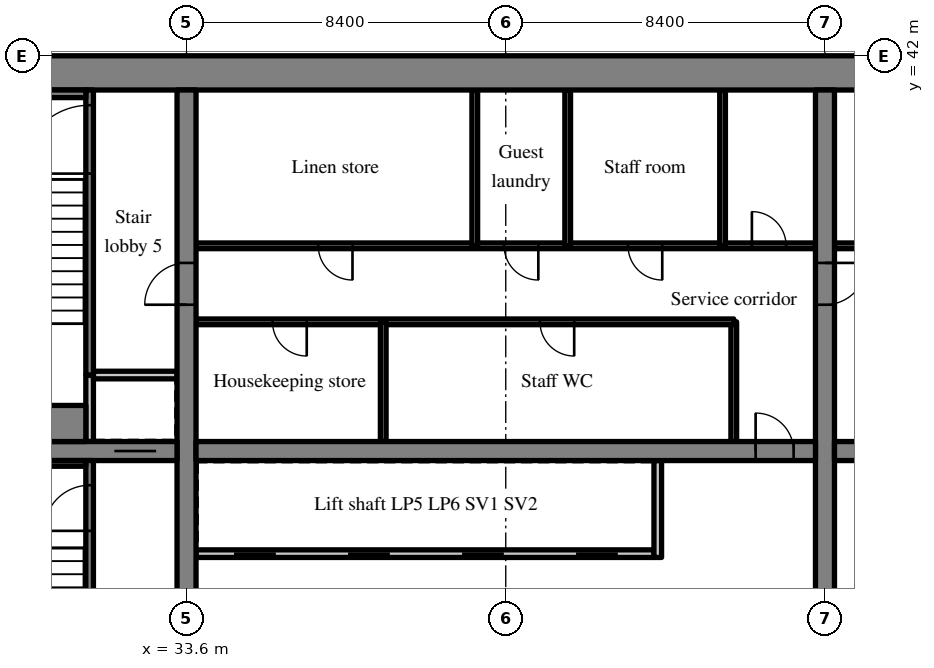
"""IFC4 building model, lengths in metres.
Left out: names, types, materials, properties, quantities, classifications, styles, units other than length and angle.
Written with IfcOpenShell. Run it as: python <this file> out.ifc"""

import sys

from ifc_helpers import new_model, si_unit, direction, frame, frame_2d, origin, place, context, subcontext, project, spatial, rectangle, extrude, source, transform, mapped, element, fill, save


model = new_model("IFC4")
c1 = context("Model", 3, precision=1e-05, world=origin(), true_north=direction((0.0, 1.0)))
c2 = subcontext(c1, "Body", "Model", "MODEL_VIEW")
j1 = project(units=[si_unit("LENGTHUNIT", "METRE"), si_unit("PLANEANGLEUNIT", "RADIAN")], contexts=[c1])
p1 = place(None, origin())
s1 = spatial("IfcSite", under=j1, at=p1, CompositionType="ELEMENT")
p2 = place(p1, origin())
s2 = spatial("IfcBuilding", under=s1, at=p2, CompositionType="ELEMENT")
p3 = place(p2, frame((0.0, 0.0, 86.4)))
s3 = spatial("IfcBuildingStorey", under=s2, at=p3, CompositionType="ELEMENT", Elevation=86.4)
m1 = source(origin(), c2, "Body", "SweptSolid", [
    extrude(rectangle(XDim=50.4, YDim=0.9, at=frame_2d((25.2, 0.0))), origin(), (0.0, 0.0, 1.0), 4.72),
])
p4 = place(p3, frame((25.2, 41.55, 0.0), z_axis=(0.0, 0.0, 1.0), x_axis=(1.0, 0.0, 0.0)))
e1 = element("IfcWall", 1, at=p4, inside=s3, PredefinedType="SHEAR", context=c2, shape_type="MappedRepresentation", body=[
    mapped(m1, transform((0.0, 0.0, 0.0), scale=1.0)),
])
m2 = source(origin(), c2, "Body", "SweptSolid", [
    extrude(rectangle(XDim=18.2, YDim=0.5, at=frame_2d((9.1, 0.0))), origin(), (0.0, 0.0, 1.0), 4.72),
])
p5 = place(p3, frame((33.6, 22.9, 0.0), z_axis=(0.0, 0.0, 1.0), x_axis=(0.0, 1.0, 0.0)))
e2 = element("IfcWall", 2, at=p5, inside=s3, PredefinedType="SHEAR", context=c2, shape_type="MappedRepresentation", body=[
    mapped(m2, transform((0.0, 0.0, 0.0), scale=1.0)),
])
m3 = source(origin(), c2, "Body", "SweptSolid", [
    extrude(rectangle(XDim=1.1, YDim=2.1, at=frame_2d((0.55, 1.05))), frame((0.0, 0.26, 0.0), z_axis=(0.0, -1.0, 0.0), x_axis=(1.0, 0.0, 0.0)), (0.0, 0.0, 1.0), 0.52),
])
p6 = place(p5, frame((12.55, 0.0, 0.0)))
e3 = element("IfcOpeningElement", 3, at=p6, cuts=e2, PredefinedType="OPENING", context=c2, shape_type="MappedRepresentation", body=[
    mapped(m3, transform((0.0, 0.0, 0.0), scale=1.0)),
])
p7 = place(p3, frame((50.4, 22.9, 0.0), z_axis=(0.0, 0.0, 1.0), x_axis=(0.0, 1.0, 0.0)))
e4 = element("IfcWall", 4, at=p7, inside=s3, PredefinedType="SHEAR", context=c2, shape_type="MappedRepresentation", body=[
    mapped(m2, transform((0.0, 0.0, 0.0), scale=1.0)),
])
p8 = place(p7, frame((12.55, 0.0, 0.0)))
e5 = element("IfcOpeningElement", 5, at=p8, cuts=e4, PredefinedType="OPENING", context=c2, shape_type="MappedRepresentation", body=[
    mapped(m3, transform((0.0, 0.0, 0.0), scale=1.0)),
])
m4 = source(origin(), c2, "Body", "SweptSolid", [
    extrude(rectangle(XDim=7.25, YDim=0.5, at=frame_2d((3.625, 0.0))), origin(), (0.0, 0.0, 1.0), 4.72),
])
p9 = place(p3, frame((26.1, 31.6, 0.0), z_axis=(0.0, 0.0, 1.0), x_axis=(1.0, 0.0, 0.0)))
e6 = element("IfcWall", 6, at=p9, inside=s3, PredefinedType="SHEAR", context=c2, shape_type="MappedRepresentation", body=[
    mapped(m4, transform((0.0, 0.0, 0.0), scale=1.0)),
])
p10 = place(p9, frame((5.6, 0.0, 0.0)))
e7 = element("IfcOpeningElement", 7, at=p10, cuts=e6, PredefinedType="OPENING", context=c2, shape_type="MappedRepresentation", body=[
    mapped(m3, transform((0.0, 0.0, 0.0), scale=1.0)),
])
m5 = source(origin(), c2, "Body", "SweptSolid", [
    extrude(rectangle(XDim=16.3, YDim=0.5, at=frame_2d((8.15, 0.0))), origin(), (0.0, 0.0, 1.0), 4.72),
])
p11 = place(p3, frame((33.85, 31.6, 0.0), z_axis=(0.0, 0.0, 1.0), x_axis=(1.0, 0.0, 0.0)))
e8 = element("IfcWall", 8, at=p11, inside=s3, PredefinedType="SHEAR", context=c2, shape_type="MappedRepresentation", body=[
    mapped(m5, transform((0.0, 0.0, 0.0), scale=1.0)),
])
m6 = source(origin(), c2, "Body", "SweptSolid", [
    extrude(rectangle(XDim=1.0, YDim=2.1, at=frame_2d((0.5, 1.05))), frame((0.0, 0.26, 0.0), z_axis=(0.0, -1.0, 0.0), x_axis=(1.0, 0.0, 0.0)), (0.0, 0.0, 1.0), 0.52),
])
p12 = place(p11, frame((14.725, 0.0, 0.0)))
e9 = element("IfcOpeningElement", 9, at=p12, cuts=e8, PredefinedType="OPENING", context=c2, shape_type="MappedRepresentation", body=[
    mapped(m6, transform((0.0, 0.0, 0.0), scale=1.0)),
])
m7 = source(origin(), c2, "Body", "SweptSolid", [
    extrude(rectangle(XDim=16.3, YDim=0.5, at=frame_2d((8.15, 0.0))), origin(), (0.0, 0.0, 1.0), 4.72),
])
p13 = place(p3, frame((50.65, 31.6, 0.0), z_axis=(0.0, 0.0, 1.0), x_axis=(1.0, 0.0, 0.0)))
e10 = element("IfcWall", 10, at=p13, inside=s3, PredefinedType="SHEAR", context=c2, shape_type="MappedRepresentation", body=[
    mapped(m7, transform((0.0, 0.0, 0.0), scale=1.0)),
])
p14 = place(p13, frame((0.575, 0.0, 0.0)))
e11 = element("IfcOpeningElement", 11, at=p14, cuts=e10, PredefinedType="OPENING", context=c2, shape_type="MappedRepresentation", body=[
    mapped(m6, transform((0.0, 0.0, 0.0), scale=1.0)),
])
m8 = source(origin(), c2, "Body", "SweptSolid", [
    extrude(rectangle(XDim=12.05, YDim=0.2, at=frame_2d((6.025, 0.0))), origin(), (0.0, 0.0, 1.0), 4.72),
])
p15 = place(p3, frame((33.85, 28.9, 0.0), z_axis=(0.0, 0.0, 1.0), x_axis=(1.0, 0.0, 0.0)))
e12 = element("IfcWall", 12, at=p15, inside=s3, PredefinedType="SOLIDWALL", context=c2, shape_type="MappedRepresentation", body=[
    mapped(m8, transform((0.0, 0.0, 0.0), scale=1.0)),
])
m9 = source(origin(), c2, "Body", "SweptSolid", [
    extrude(rectangle(XDim=1.1, YDim=2.1, at=frame_2d((0.55, 1.05))), frame((0.0, 0.11, 0.0), z_axis=(0.0, -1.0, 0.0), x_axis=(1.0, 0.0, 0.0)), (0.0, 0.0, 1.0), 0.22),
])
p16 = place(p15, frame((1.0, 0.0, 0.0)))
e13 = element("IfcOpeningElement", 13, at=p16, cuts=e12, PredefinedType="OPENING", context=c2, shape_type="MappedRepresentation", body=[
    mapped(m9, transform((0.0, 0.0, 0.0), scale=1.0)),
])
p17 = place(p15, frame((4.0, 0.0, 0.0)))
e14 = element("IfcOpeningElement", 14, at=p17, cuts=e12, PredefinedType="OPENING", context=c2, shape_type="MappedRepresentation", body=[
    mapped(m9, transform((0.0, 0.0, 0.0), scale=1.0)),
])
p18 = place(p15, frame((7.0, 0.0, 0.0)))
e15 = element("IfcOpeningElement", 15, at=p18, cuts=e12, PredefinedType="OPENING", context=c2, shape_type="MappedRepresentation", body=[
    mapped(m9, transform((0.0, 0.0, 0.0), scale=1.0)),
])
p19 = place(p15, frame((10.0, 0.0, 0.0)))
e16 = element("IfcOpeningElement", 16, at=p19, cuts=e12, PredefinedType="OPENING", context=c2, shape_type="MappedRepresentation", body=[
    mapped(m9, transform((0.0, 0.0, 0.0), scale=1.0)),
])
m10 = source(origin(), c2, "Body", "SweptSolid", [
    extrude(rectangle(XDim=2.55, YDim=0.2, at=frame_2d((1.275, 0.0))), origin(), (0.0, 0.0, 1.0), 4.72),
])
p20 = place(p3, frame((46.0, 28.8, 0.0), z_axis=(0.0, 0.0, 1.0), x_axis=(0.0, 1.0, 0.0)))
e17 = element("IfcWall", 17, at=p20, inside=s3, PredefinedType="SOLIDWALL", context=c2, shape_type="MappedRepresentation", body=[
    mapped(m10, transform((0.0, 0.0, 0.0), scale=1.0)),
])
m11 = source(origin(), c2, "Body", "SweptSolid", [
    extrude(rectangle(XDim=3.15, YDim=0.15, at=frame_2d((1.575, 0.0))), origin(), (0.0, 0.0, 1.0), 4.72),
])
p21 = place(p3, frame((48.0, 31.85, 0.0), z_axis=(0.0, 0.0, 1.0), x_axis=(0.0, 1.0, 0.0)))
e18 = element("IfcWall", 18, at=p21, inside=s3, PredefinedType="PARTITIONING", context=c2, shape_type="MappedRepresentation", body=[
    mapped(m11, transform((0.0, 0.0, 0.0), scale=1.0)),
])
m12 = source(origin(), c2, "Body", "SweptSolid", [
    extrude(rectangle(XDim=14.15, YDim=0.15, at=frame_2d((7.075, 0.0))), origin(), (0.0, 0.0, 1.0), 4.72),
])
p22 = place(p3, frame((33.85, 35.0, 0.0), z_axis=(0.0, 0.0, 1.0), x_axis=(1.0, 0.0, 0.0)))
e19 = element("IfcWall", 19, at=p22, inside=s3, PredefinedType="PARTITIONING", context=c2, shape_type="MappedRepresentation", body=[
    mapped(m12, transform((0.0, 0.0, 0.0), scale=1.0)),
])
m13 = source(origin(), c2, "Body", "SweptSolid", [
    extrude(rectangle(XDim=0.9, YDim=2.1, at=frame_2d((0.45, 1.05))), frame((0.0, 0.085, 0.0), z_axis=(0.0, -1.0, 0.0), x_axis=(1.0, 0.0, 0.0)), (0.0, 0.0, 1.0), 0.17),
])
p23 = place(p22, frame((2.013, 0.0, 0.0)))
e20 = element("IfcOpeningElement", 20, at=p23, cuts=e19, PredefinedType="OPENING", context=c2, shape_type="MappedRepresentation", body=[
    mapped(m13, transform((0.0, 0.0, 0.0), scale=1.0)),
])
p24 = place(p22, frame((9.051, 0.0, 0.0)))
e21 = element("IfcOpeningElement", 21, at=p24, cuts=e19, PredefinedType="OPENING", context=c2, shape_type="MappedRepresentation", body=[
    mapped(m13, transform((0.0, 0.0, 0.0), scale=1.0)),
])
m14 = source(origin(), c2, "Body", "SweptSolid", [
    extrude(rectangle(XDim=16.3, YDim=0.15, at=frame_2d((8.15, 0.0))), origin(), (0.0, 0.0, 1.0), 4.72),
])
p25 = place(p3, frame((33.85, 37.0, 0.0), z_axis=(0.0, 0.0, 1.0), x_axis=(1.0, 0.0, 0.0)))
e22 = element("IfcWall", 22, at=p25, inside=s3, PredefinedType="PARTITIONING", context=c2, shape_type="MappedRepresentation", body=[
    mapped(m14, transform((0.0, 0.0, 0.0), scale=1.0)),
])
p26 = place(p25, frame((3.217, 0.0, 0.0)))
e23 = element("IfcOpeningElement", 23, at=p26, cuts=e22, PredefinedType="OPENING", context=c2, shape_type="MappedRepresentation", body=[
    mapped(m13, transform((0.0, 0.0, 0.0), scale=1.0)),
])
p27 = place(p25, frame((8.107, 0.0, 0.0)))
e24 = element("IfcOpeningElement", 24, at=p27, cuts=e22, PredefinedType="OPENING", context=c2, shape_type="MappedRepresentation", body=[
    mapped(m13, transform((0.0, 0.0, 0.0), scale=1.0)),
])
p28 = place(p25, frame((11.368, 0.0, 0.0)))
e25 = element("IfcOpeningElement", 25, at=p28, cuts=e22, PredefinedType="OPENING", context=c2, shape_type="MappedRepresentation", body=[
    mapped(m13, transform((0.0, 0.0, 0.0), scale=1.0)),
])
p29 = place(p25, frame((14.627, 0.0, 0.0)))
e26 = element("IfcOpeningElement", 26, at=p29, cuts=e22, PredefinedType="OPENING", context=c2, shape_type="MappedRepresentation", body=[
    mapped(m13, transform((0.0, 0.0, 0.0), scale=1.0)),
])
p30 = place(p3, frame((38.776, 31.85, 0.0), z_axis=(0.0, 0.0, 1.0), x_axis=(0.0, 1.0, 0.0)))
e27 = element("IfcWall", 27, at=p30, inside=s3, PredefinedType="PARTITIONING", context=c2, shape_type="MappedRepresentation", body=[
    mapped(m11, transform((0.0, 0.0, 0.0), scale=1.0)),
])
m15 = source(origin(), c2, "Body", "SweptSolid", [
    extrude(rectangle(XDim=4.1, YDim=0.15, at=frame_2d((2.05, 0.0))), origin(), (0.0, 0.0, 1.0), 4.72),
])
for number, where, z_axis, x_axis in (
    (28, (41.185, 37.0, 0.0), (0.0, 0.0, 1.0), (0.0, 1.0, 0.0)),
    (29, (43.63, 37.0, 0.0), (0.0, 0.0, 1.0), (0.0, 1.0, 0.0)),
    (30, (47.705, 37.0, 0.0), (0.0, 0.0, 1.0), (0.0, 1.0, 0.0)),
):
    element("IfcWall", number, at=place(p3, frame(where, z_axis=z_axis, x_axis=x_axis)), inside=s3, PredefinedType="PARTITIONING", context=c2, shape_type="MappedRepresentation", body=[
        mapped(m15, transform((0.0, 0.0, 0.0), scale=1.0)),
    ])
m16 = source(origin(), c2, "Body", "SweptSolid", [
    extrude(rectangle(XDim=16.3, YDim=0.15, at=frame_2d((8.15, 0.0))), origin(), (0.0, 0.0, 1.0), 4.72),
])
p31 = place(p3, frame((66.95, 37.0, 0.0), z_axis=(0.0, 0.0, 1.0), x_axis=(-1.0, 0.0, 0.0)))
e31 = element("IfcWall", 31, at=p31, inside=s3, PredefinedType="PARTITIONING", context=c2, shape_type="MappedRepresentation", body=[
    mapped(m16, transform((0.0, 0.0, 0.0), scale=1.0)),
])
p32 = place(p31, frame((0.773, 0.0, 0.0)))
e32 = element("IfcOpeningElement", 32, at=p32, cuts=e31, PredefinedType="OPENING", context=c2, shape_type="MappedRepresentation", body=[
    mapped(m13, transform((0.0, 0.0, 0.0), scale=1.0)),
])
p33 = place(p31, frame((3.625, 0.0, 0.0)))
e33 = element("IfcOpeningElement", 33, at=p33, cuts=e31, PredefinedType="OPENING", context=c2, shape_type="MappedRepresentation", body=[
    mapped(m13, transform((0.0, 0.0, 0.0), scale=1.0)),
])
p34 = place(p31, frame((9.33, 0.0, 0.0)))
e34 = element("IfcOpeningElement", 34, at=p34, cuts=e31, PredefinedType="OPENING", context=c2, shape_type="MappedRepresentation", body=[
    mapped(m13, transform((0.0, 0.0, 0.0), scale=1.0)),
])
p35 = place(p31, frame((14.627, 0.0, 0.0)))
e35 = element("IfcOpeningElement", 35, at=p35, cuts=e31, PredefinedType="OPENING", context=c2, shape_type="MappedRepresentation", body=[
    mapped(m13, transform((0.0, 0.0, 0.0), scale=1.0)),
])
m17 = source(origin(), c2, "Body", "SweptSolid", [
    extrude(rectangle(XDim=8.45, YDim=0.2, at=frame_2d((4.225, 0.0))), origin(), (0.0, 0.0, 1.0), 4.72),
])
p36 = place(p3, frame((31.05, 22.9, 0.0), z_axis=(0.0, 0.0, 1.0), x_axis=(0.0, 1.0, 0.0)))
e36 = element("IfcWall", 36, at=p36, inside=s3, PredefinedType="SOLIDWALL", context=c2, shape_type="MappedRepresentation", body=[
    mapped(m17, transform((0.0, 0.0, 0.0), scale=1.0)),
])
m18 = source(origin(), c2, "Body", "SweptSolid", [
    extrude(rectangle(XDim=1.2, YDim=2.1, at=frame_2d((0.6, 1.05))), frame((0.0, 0.11, 0.0), z_axis=(0.0, -1.0, 0.0), x_axis=(1.0, 0.0, 0.0)), (0.0, 0.0, 1.0), 0.22),
])
p37 = place(p36, frame((6.6, 0.0, 0.0)))
e37 = element("IfcOpeningElement", 37, at=p37, cuts=e36, PredefinedType="OPENING", context=c2, shape_type="MappedRepresentation", body=[
    mapped(m18, transform((0.0, 0.0, 0.0), scale=1.0)),
])
m19 = source(origin(), c2, "Body", "SweptSolid", [
    extrude(rectangle(XDim=1.75, YDim=0.2, at=frame_2d((0.875, 0.0))), origin(), (0.0, 0.0, 1.0), 4.72),
])
p38 = place(p3, frame((31.05, 31.85, 0.0), z_axis=(0.0, 0.0, 1.0), x_axis=(0.0, 1.0, 0.0)))
e38 = element("IfcWall", 38, at=p38, inside=s3, PredefinedType="SOLIDWALL", context=c2, shape_type="MappedRepresentation", body=[
    mapped(m19, transform((0.0, 0.0, 0.0), scale=1.0)),
])
m20 = source(origin(), c2, "Body", "SweptSolid", [
    extrude(rectangle(XDim=2.2, YDim=0.2, at=frame_2d((1.1, 0.0))), origin(), (0.0, 0.0, 1.0), 4.72),
])
p39 = place(p3, frame((31.15, 33.6, 0.0), z_axis=(0.0, 0.0, 1.0), x_axis=(1.0, 0.0, 0.0)))
e39 = element("IfcWall", 39, at=p39, inside=s3, PredefinedType="SOLIDWALL", context=c2, shape_type="MappedRepresentation", body=[
    mapped(m20, transform((0.0, 0.0, 0.0), scale=1.0)),
])
m21 = source(origin(), c2, "Body", "SweptSolid", [
    extrude(rectangle(XDim=7.5, YDim=0.2, at=frame_2d((3.75, 0.0))), origin(), (0.0, 0.0, 1.0), 4.72),
])
p40 = place(p3, frame((31.05, 33.6, 0.0), z_axis=(0.0, 0.0, 1.0), x_axis=(0.0, 1.0, 0.0)))
e40 = element("IfcWall", 40, at=p40, inside=s3, PredefinedType="SOLIDWALL", context=c2, shape_type="MappedRepresentation", body=[
    mapped(m21, transform((0.0, 0.0, 0.0), scale=1.0)),
])
m22 = source(origin(), c2, "Body", "SweptSolid", [
    extrude(rectangle(XDim=1.8, YDim=2.1, at=frame_2d((0.9, 1.05))), frame((0.0, 0.11, 0.0), z_axis=(0.0, -1.0, 0.0), x_axis=(1.0, 0.0, 0.0)), (0.0, 0.0, 1.0), 0.22),
])
p41 = place(p40, frame((5.3, 0.0, 0.0)))
e41 = element("IfcOpeningElement", 41, at=p41, cuts=e40, PredefinedType="OPENING", context=c2, shape_type="MappedRepresentation", body=[
    mapped(m22, transform((0.0, 0.0, 0.0), scale=1.0)),
])
m23 = source(origin(), c2, "Body", "SweptSolid", [
    extrude(rectangle(XDim=4.85, YDim=0.15, at=frame_2d((2.425, 0.0))), origin(), (0.0, 0.0, 1.0), 4.72),
])
p42 = place(p3, frame((26.1, 31.275, 0.0), z_axis=(0.0, 0.0, 1.0), x_axis=(1.0, 0.0, 0.0)))
e42 = element("IfcWall", 42, at=p42, inside=s3, PredefinedType="SOLIDWALL", context=c2, shape_type="MappedRepresentation", body=[
    mapped(m23, transform((0.0, 0.0, 0.0), scale=1.0)),
])
m24 = source(origin(), c2, "Body", "SweptSolid", [
    extrude(rectangle(XDim=4.85, YDim=0.2, at=frame_2d((2.425, 0.0))), origin(), (0.0, 0.0, 1.0), 4.72),
])
p43 = place(p3, frame((26.1, 41.0, 0.0), z_axis=(0.0, 0.0, 1.0), x_axis=(1.0, 0.0, 0.0)))
e43 = element("IfcWall", 43, at=p43, inside=s3, PredefinedType="SOLIDWALL", context=c2, shape_type="MappedRepresentation", body=[
    mapped(m24, transform((0.0, 0.0, 0.0), scale=1.0)),
])
m25 = source(origin(), c2, "Body", "SweptSolid", [
    extrude(rectangle(XDim=4.85, YDim=0.95, at=frame_2d((2.425, 0.0))), origin(), (0.0, 0.0, 1.0), 4.72),
])
p44 = place(p3, frame((26.1, 32.325, 0.0), z_axis=(0.0, 0.0, 1.0), x_axis=(1.0, 0.0, 0.0)))
e44 = element("IfcWall", 44, at=p44, inside=s3, PredefinedType="SOLIDWALL", context=c2, shape_type="MappedRepresentation", body=[
    mapped(m25, transform((0.0, 0.0, 0.0), scale=1.0)),
])
m26 = source(origin(), c2, "Body", "SweptSolid", [
    extrude(rectangle(XDim=1.0, YDim=2.1, at=frame_2d((0.5, 1.05))), frame((0.0, 0.025, 0.0), z_axis=(0.0, -1.0, 0.0), x_axis=(1.0, 0.0, 0.0)), (0.0, 0.0, 1.0), 0.05),
])
p45 = place(p12, origin())
e45 = element("IfcDoor", 45, at=p45, inside=s3, OperationType="SINGLE_SWING_LEFT", PredefinedType="DOOR", context=c2, shape_type="MappedRepresentation", body=[
    mapped(m26, transform((0.0, 0.0, 0.0), scale=1.0)),
])
fill(e9, e45)
m27 = source(origin(), c2, "Body", "SweptSolid", [
    extrude(rectangle(XDim=1.1, YDim=2.1, at=frame_2d((0.55, 1.05))), frame((0.0, 0.025, 0.0), z_axis=(0.0, -1.0, 0.0), x_axis=(1.0, 0.0, 0.0)), (0.0, 0.0, 1.0), 0.05),
])
p46 = place(p16, origin())
e46 = element("IfcDoor", 46, at=p46, inside=s3, OperationType="SLIDING_TO_LEFT", PredefinedType="DOOR", context=c2, shape_type="MappedRepresentation", body=[
    mapped(m27, transform((0.0, 0.0, 0.0), scale=1.0)),
])
fill(e13, e46)
p47 = place(p17, origin())
e47 = element("IfcDoor", 47, at=p47, inside=s3, OperationType="SLIDING_TO_RIGHT", PredefinedType="DOOR", context=c2, shape_type="MappedRepresentation", body=[
    mapped(m27, transform((0.0, 0.0, 0.0), scale=1.0)),
])
fill(e14, e47)
p48 = place(p18, origin())
e48 = element("IfcDoor", 48, at=p48, inside=s3, OperationType="SLIDING_TO_LEFT", PredefinedType="DOOR", context=c2, shape_type="MappedRepresentation", body=[
    mapped(m27, transform((0.0, 0.0, 0.0), scale=1.0)),
])
fill(e15, e48)
p49 = place(p19, origin())
e49 = element("IfcDoor", 49, at=p49, inside=s3, OperationType="SLIDING_TO_RIGHT", PredefinedType="DOOR", context=c2, shape_type="MappedRepresentation", body=[
    mapped(m27, transform((0.0, 0.0, 0.0), scale=1.0)),
])
fill(e16, e49)
m28 = source(origin(), c2, "Body", "SweptSolid", [
    extrude(rectangle(XDim=0.9, YDim=2.1, at=frame_2d((0.45, 1.05))), frame((0.0, 0.025, 0.0), z_axis=(0.0, -1.0, 0.0), x_axis=(1.0, 0.0, 0.0)), (0.0, 0.0, 1.0), 0.05),
])
p50 = place(p23, origin())
e50 = element("IfcDoor", 50, at=p50, inside=s3, OperationType="SINGLE_SWING_RIGHT", PredefinedType="DOOR", context=c2, shape_type="MappedRepresentation", body=[
    mapped(m28, transform((0.0, 0.0, 0.0), scale=1.0)),
])
fill(e20, e50)
p51 = place(p24, origin())
e51 = element("IfcDoor", 51, at=p51, inside=s3, OperationType="SINGLE_SWING_RIGHT", PredefinedType="DOOR", context=c2, shape_type="MappedRepresentation", body=[
    mapped(m28, transform((0.0, 0.0, 0.0), scale=1.0)),
])
fill(e21, e51)
p52 = place(p26, origin())
e52 = element("IfcDoor", 52, at=p52, inside=s3, OperationType="SINGLE_SWING_RIGHT", PredefinedType="DOOR", context=c2, shape_type="MappedRepresentation", body=[
    mapped(m28, transform((0.0, 0.0, 0.0), scale=1.0)),
])
fill(e23, e52)
p53 = place(p27, origin())
e53 = element("IfcDoor", 53, at=p53, inside=s3, OperationType="SINGLE_SWING_RIGHT", PredefinedType="DOOR", context=c2, shape_type="MappedRepresentation", body=[
    mapped(m28, transform((0.0, 0.0, 0.0), scale=1.0)),
])
fill(e24, e53)
p54 = place(p28, origin())
e54 = element("IfcDoor", 54, at=p54, inside=s3, OperationType="SINGLE_SWING_RIGHT", PredefinedType="DOOR", context=c2, shape_type="MappedRepresentation", body=[
    mapped(m28, transform((0.0, 0.0, 0.0), scale=1.0)),
])
fill(e25, e54)
p55 = place(p29, origin())
e55 = element("IfcDoor", 55, at=p55, inside=s3, OperationType="SINGLE_SWING_LEFT", PredefinedType="DOOR", context=c2, shape_type="MappedRepresentation", body=[
    mapped(m28, transform((0.0, 0.0, 0.0), scale=1.0)),
])
fill(e26, e55)
m29 = source(origin(), c2, "Body", "SweptSolid", [
    extrude(rectangle(XDim=1.2, YDim=2.1, at=frame_2d((0.6, 1.05))), frame((0.0, 0.025, 0.0), z_axis=(0.0, -1.0, 0.0), x_axis=(1.0, 0.0, 0.0)), (0.0, 0.0, 1.0), 0.05),
])
p56 = place(p37, origin())
e56 = element("IfcDoor", 56, at=p56, inside=s3, OperationType="SINGLE_SWING_LEFT", PredefinedType="DOOR", context=c2, shape_type="MappedRepresentation", body=[
    mapped(m29, transform((0.0, 0.0, 0.0), scale=1.0)),
])
fill(e37, e56)
p57 = place(p10, origin())
e57 = element("IfcDoor", 57, at=p57, inside=s3, OperationType="SLIDING_TO_RIGHT", PredefinedType="DOOR", context=c2, shape_type="MappedRepresentation", body=[
    mapped(m27, transform((0.0, 0.0, 0.0), scale=1.0)),
])
fill(e7, e57)
m30 = source(origin(), c2, "Body", "SweptSolid", [
    extrude(rectangle(XDim=1.8, YDim=2.1, at=frame_2d((0.9, 1.05))), frame((0.0, 0.025, 0.0), z_axis=(0.0, -1.0, 0.0), x_axis=(1.0, 0.0, 0.0)), (0.0, 0.0, 1.0), 0.05),
])
p58 = place(p41, origin())
e58 = element("IfcDoor", 58, at=p58, inside=s3, OperationType="SINGLE_SWING_LEFT", PredefinedType="DOOR", context=c2, shape_type="MappedRepresentation", body=[
    mapped(m30, transform((0.0, 0.0, 0.0), scale=1.0)),
])
fill(e41, e58)
p59 = place(p6, origin())
e59 = element("IfcDoor", 59, at=p59, inside=s3, OperationType="SINGLE_SWING_LEFT", PredefinedType="DOOR", context=c2, shape_type="MappedRepresentation", body=[
    mapped(m27, transform((0.0, 0.0, 0.0), scale=1.0)),
])
fill(e3, e59)
p60 = place(p8, origin())
e60 = element("IfcDoor", 60, at=p60, inside=s3, OperationType="SINGLE_SWING_RIGHT", PredefinedType="DOOR", context=c2, shape_type="MappedRepresentation", body=[
    mapped(m27, transform((0.0, 0.0, 0.0), scale=1.0)),
])
fill(e5, e60)
save(model, sys.argv[1])
